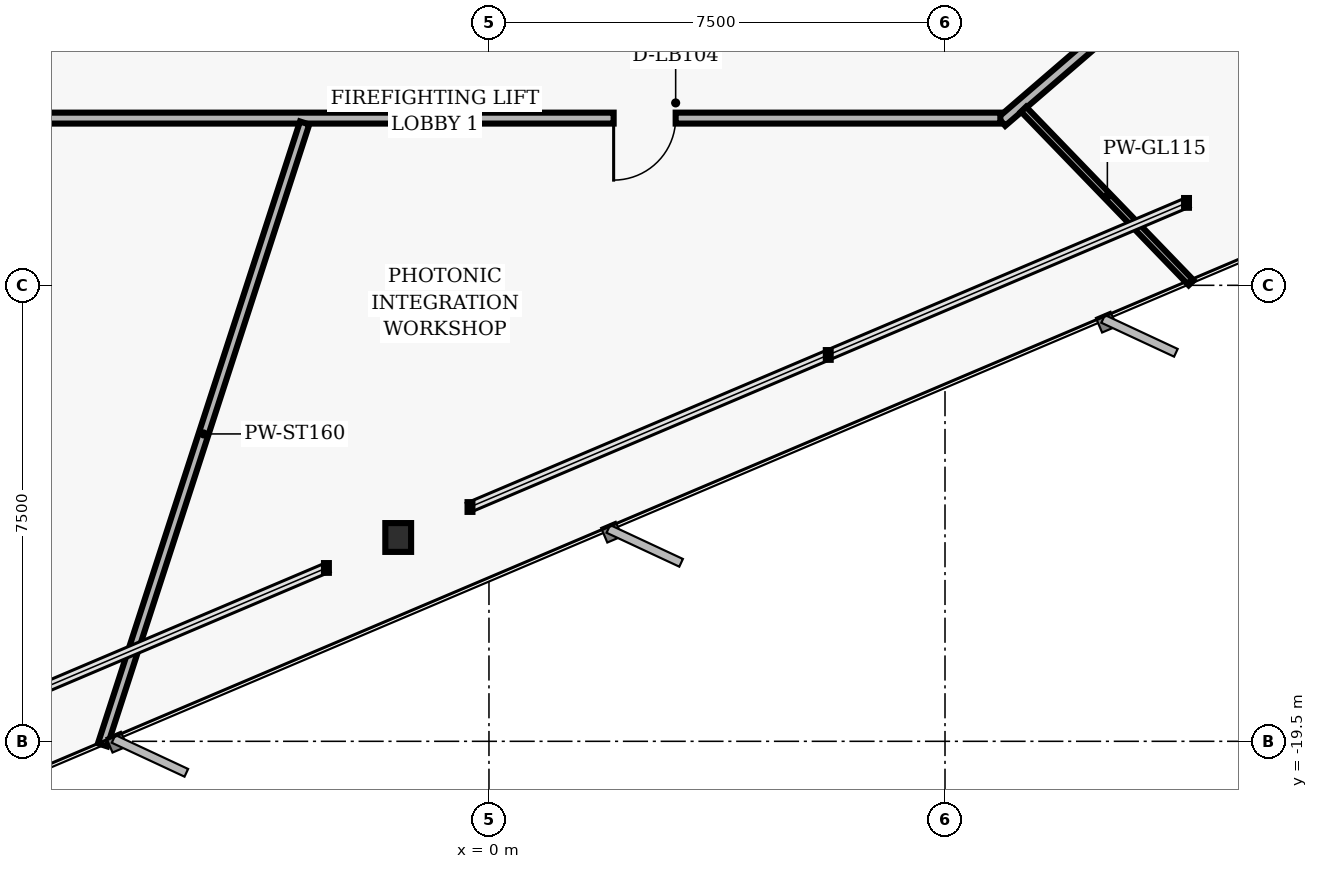
"""IFC4 building model, lengths in metres.
Left out: names, types, materials, properties, quantities, classifications, styles, units other than length and angle.
Written with IfcOpenShell. Run it as: python <this file> out.ifc"""

import sys

from ifc_helpers import new_model, si_unit, direction, frame, frame_2d, origin, origin_2d, place, context, subcontext, project, spatial, rectangle, i_section, extrude, element, fill, save


model = new_model("IFC4")
c1 = context("Model", 3, precision=1e-05, world=origin(), true_north=direction((0.0, 1.0)))
c2 = subcontext(c1, "Body", "Model", "MODEL_VIEW")
j1 = project(units=[si_unit("LENGTHUNIT", "METRE"), si_unit("PLANEANGLEUNIT", "RADIAN")], contexts=[c1])
p1 = place(None, origin())
s1 = spatial("IfcSite", under=j1, at=p1, CompositionType="ELEMENT")
p2 = place(p1, origin())
s2 = spatial("IfcBuilding", under=s1, at=p2, CompositionType="ELEMENT")
p3 = place(p2, frame((0.0, 0.0, 52.96)))
s3 = spatial("IfcBuildingStorey", under=s2, at=p3, CompositionType="ELEMENT", Elevation=52.96)
p4 = place(p3, frame((-1.493, -16.148, 0.0), z_axis=(0.0, 0.0, 1.0), x_axis=(1.0, 0.0, 0.0)))
e1 = element("IfcColumn", 1, at=p4, inside=s3, PredefinedType="COLUMN", context=c2, shape_type="SweptSolid", body=[
    extrude(i_section(OverallWidth=0.424, OverallDepth=0.474, WebThickness=0.048, FlangeThickness=0.077, FilletRadius=0.025, at=origin_2d()), origin(), (0.0, 0.0, 1.0), 3.36),
])
p5 = place(p3, frame((13.268, -5.141, 0.0), z_axis=(0.0, 0.0, 1.0), x_axis=(-0.757534501725, -0.65279512766, 0.0)))
e2 = element("IfcWall", 2, at=p5, inside=s3, PredefinedType="PARTITIONING", context=c2, shape_type="SweptSolid", body=[
    extrude(rectangle(XDim=6.385, YDim=0.18, at=frame_2d((3.192, 0.0))), origin(), (0.0, 0.0, 1.0), 3.073),
])
p6 = place(p5, frame((2.639, 0.0, 0.0)))
e3 = element("IfcOpeningElement", 3, at=p6, cuts=e2, PredefinedType="OPENING", context=c2, shape_type="SweptSolid", body=[
    extrude(rectangle(XDim=0.96, YDim=2.02, at=frame_2d((0.48, 1.01))), frame((0.0, 0.1, 0.0), z_axis=(0.0, -1.0, 0.0), x_axis=(1.0, 0.0, 0.0)), (0.0, 0.0, 1.0), 0.2),
])
p7 = place(p3, frame((8.41, -9.25, 0.0), z_axis=(0.0, 0.0, 1.0), x_axis=(-1.0, 0.0, 0.0)))
e4 = element("IfcWall", 4, at=p7, inside=s3, PredefinedType="PARTITIONING", context=c2, shape_type="SweptSolid", body=[
    extrude(rectangle(XDim=17.0, YDim=0.18, at=frame_2d((8.5, 0.0))), origin(), (0.0, 0.0, 1.0), 2.587),
])
p8 = place(p7, frame((5.34, 0.0, 0.0)))
e5 = element("IfcOpeningElement", 5, at=p8, cuts=e4, PredefinedType="OPENING", context=c2, shape_type="SweptSolid", body=[
    extrude(rectangle(XDim=1.02, YDim=2.02, at=frame_2d((0.51, 1.01))), frame((0.0, 0.1, 0.0), z_axis=(0.0, -1.0, 0.0), x_axis=(1.0, 0.0, 0.0)), (0.0, 0.0, 1.0), 0.2),
])
p9 = place(p3, frame((-3.031, -9.33, 0.0), z_axis=(0.0, 0.0, 1.0), x_axis=(-0.309020370084, -0.951055419454, 0.0)))
e6 = element("IfcWall", 6, at=p9, inside=s3, PredefinedType="PARTITIONING", context=c2, shape_type="SweptSolid", body=[
    extrude(rectangle(XDim=10.755, YDim=0.16, at=frame_2d((5.377, 0.0))), origin(), (0.0, 0.0, 1.0), 3.073),
])
p10 = place(p3, frame((8.792, -9.104, 0.0), z_axis=(0.0, 0.0, 1.0), x_axis=(0.694664773763, -0.719333616685, 0.0)))
e7 = element("IfcWall", 7, at=p10, inside=s3, PredefinedType="MOVABLE", context=c2, shape_type="SweptSolid", body=[
    extrude(rectangle(XDim=3.969, YDim=0.115, at=frame_2d((1.984, 0.0))), origin(), (0.0, 0.0, 1.0), 3.073),
])
p11 = place(p8, origin())
e8 = element("IfcDoor", 8, at=p11, inside=s3, OperationType="SINGLE_SWING_RIGHT", PredefinedType="DOOR", context=c2, shape_type="SweptSolid", body=[
    extrude(rectangle(XDim=1.02, YDim=2.02, at=frame_2d((0.51, 1.01))), frame((0.0, 0.025, 0.0), z_axis=(0.0, -1.0, 0.0), x_axis=(1.0, 0.0, 0.0)), (0.0, 0.0, 1.0), 0.05),
])
fill(e5, e8)
save(model, sys.argv[1])
